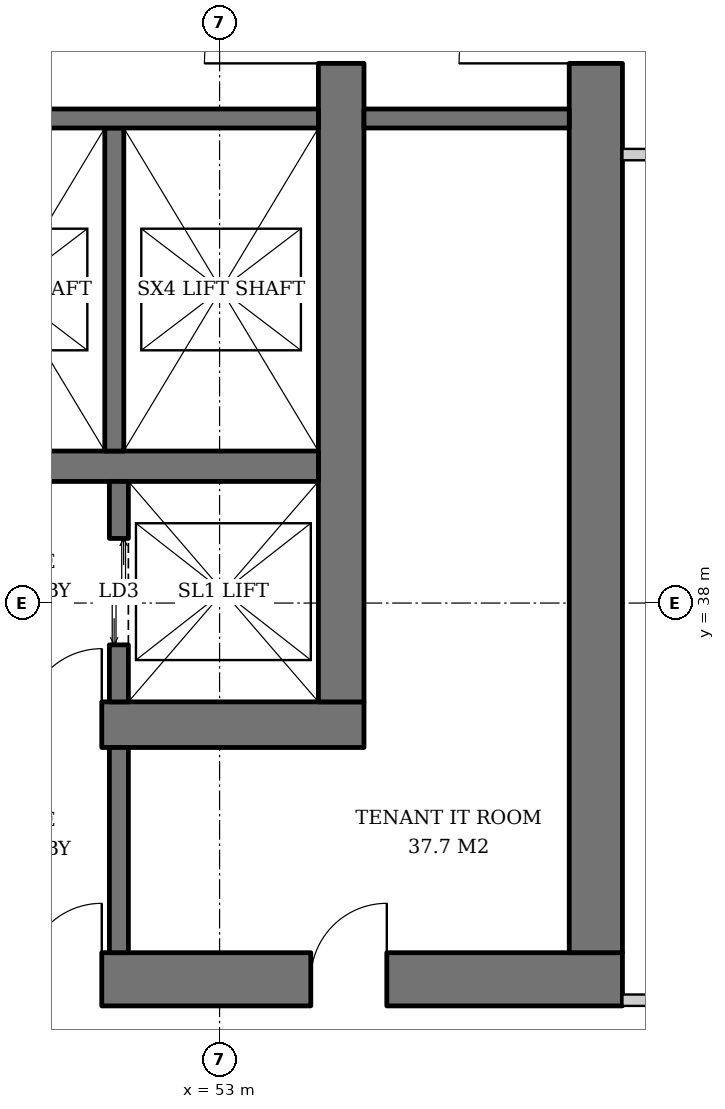
"""IFC4 building model, lengths in metres.
Left out: names, types, materials, properties, quantities, classifications, styles, units other than length and angle.
Written with IfcOpenShell. Run it as: python <this file> out.ifc"""

import sys

from ifc_helpers import new_model, si_unit, direction, frame, frame_2d, origin, place, context, subcontext, project, spatial, rectangle, extrude, element, fill, save


model = new_model("IFC4")
c1 = context("Model", 3, precision=1e-05, world=origin(), true_north=direction((0.0, 1.0)))
c2 = subcontext(c1, "Body", "Model", "MODEL_VIEW")
j1 = project(units=[si_unit("LENGTHUNIT", "METRE"), si_unit("PLANEANGLEUNIT", "RADIAN")], contexts=[c1])
p1 = place(None, origin())
s1 = spatial("IfcSite", under=j1, at=p1, CompositionType="ELEMENT")
p2 = place(p1, origin())
s2 = spatial("IfcBuilding", under=s1, at=p2, CompositionType="ELEMENT")
p3 = place(p2, frame((0.0, 0.0, 100.8)))
s3 = spatial("IfcBuildingStorey", under=s2, at=p3, CompositionType="ELEMENT", Elevation=100.8)
p4 = place(p3, frame((35.1, 36.4, 0.0), z_axis=(0.0, 0.0, 1.0), x_axis=(1.0, 0.0, 0.0)))
e1 = element("IfcWall", 1, at=p4, inside=s3, PredefinedType="SHEAR", context=c2, shape_type="SweptSolid", body=[
    extrude(rectangle(XDim=19.8, YDim=0.6, at=frame_2d((9.9, 0.0))), origin(), (0.0, 0.0, 1.0), 3.8),
])
p5 = place(p4, frame((3.9, 0.0, 0.0)))
e2 = element("IfcOpeningElement", 2, at=p5, cuts=e1, PredefinedType="OPENING", context=c2, shape_type="SweptSolid", body=[
    extrude(rectangle(XDim=1.0, YDim=2.1, at=frame_2d((0.5, 1.05))), frame((0.0, 0.31, 0.0), z_axis=(0.0, -1.0, 0.0), x_axis=(1.0, 0.0, 0.0)), (0.0, 0.0, 1.0), 0.62),
])
p6 = place(p4, frame((15.35, 0.0, 0.0)))
e3 = element("IfcOpeningElement", 3, at=p6, cuts=e1, PredefinedType="OPENING", context=c2, shape_type="SweptSolid", body=[
    extrude(rectangle(XDim=1.0, YDim=2.1, at=frame_2d((0.5, 1.05))), frame((0.0, 0.31, 0.0), z_axis=(0.0, -1.0, 0.0), x_axis=(1.0, 0.0, 0.0)), (0.0, 0.0, 1.0), 0.62),
])
p7 = place(p3, frame((54.6, 36.7, 0.0), z_axis=(0.0, 0.0, 1.0), x_axis=(0.0, 1.0, 0.0)))
e4 = element("IfcWall", 4, at=p7, inside=s3, PredefinedType="SHEAR", context=c2, shape_type="SweptSolid", body=[
    extrude(rectangle(XDim=18.6, YDim=0.6, at=frame_2d((9.3, 0.0))), origin(), (0.0, 0.0, 1.0), 3.8),
])
p8 = place(p7, frame((8.4, 0.0, 0.0)))
e5 = element("IfcOpeningElement", 5, at=p8, cuts=e4, PredefinedType="OPENING", context=c2, shape_type="SweptSolid", body=[
    extrude(rectangle(XDim=1.8, YDim=2.4, at=frame_2d((0.9, 1.2))), frame((0.0, 0.31, 0.0), z_axis=(0.0, -1.0, 0.0), x_axis=(1.0, 0.0, 0.0)), (0.0, 0.0, 1.0), 0.62),
])
p9 = place(p3, frame((31.7, 33.05, 0.0), z_axis=(0.0, 0.0, 1.0), x_axis=(1.0, 0.0, 0.0)))
e6 = element("IfcWall", 6, at=p9, inside=s3, PredefinedType="SHEAR", context=c2, shape_type="SweptSolid", body=[
    extrude(rectangle(XDim=26.6, YDim=0.7, at=frame_2d((13.3, 0.0))), origin(), (0.0, 0.0, 1.0), 3.8),
])
p10 = place(p9, frame((7.3, 0.0, 0.0)))
e7 = element("IfcOpeningElement", 7, at=p10, cuts=e6, PredefinedType="OPENING", context=c2, shape_type="SweptSolid", body=[
    extrude(rectangle(XDim=1.0, YDim=2.1, at=frame_2d((0.5, 1.05))), frame((0.0, 0.36, 0.0), z_axis=(0.0, -1.0, 0.0), x_axis=(1.0, 0.0, 0.0)), (0.0, 0.0, 1.0), 0.72),
])
p11 = place(p9, frame((18.75, 0.0, 0.0)))
e8 = element("IfcOpeningElement", 8, at=p11, cuts=e6, PredefinedType="OPENING", context=c2, shape_type="SweptSolid", body=[
    extrude(rectangle(XDim=1.0, YDim=2.1, at=frame_2d((0.5, 1.05))), frame((0.0, 0.36, 0.0), z_axis=(0.0, -1.0, 0.0), x_axis=(1.0, 0.0, 0.0)), (0.0, 0.0, 1.0), 0.72),
])
p12 = place(p9, frame((3.2, 0.0, 0.0)))
e9 = element("IfcOpeningElement", 9, at=p12, cuts=e6, PredefinedType="OPENING", context=c2, shape_type="SweptSolid", body=[
    extrude(rectangle(XDim=1.0, YDim=2.1, at=frame_2d((0.5, 1.05))), frame((0.0, 0.36, 0.0), z_axis=(0.0, -1.0, 0.0), x_axis=(1.0, 0.0, 0.0)), (0.0, 0.0, 1.0), 0.72),
])
p13 = place(p9, frame((10.42, 0.0, 0.0)))
e10 = element("IfcOpeningElement", 10, at=p13, cuts=e6, PredefinedType="OPENING", context=c2, shape_type="SweptSolid", body=[
    extrude(rectangle(XDim=1.0, YDim=2.1, at=frame_2d((0.5, 1.05))), frame((0.0, 0.36, 0.0), z_axis=(0.0, -1.0, 0.0), x_axis=(1.0, 0.0, 0.0)), (0.0, 0.0, 1.0), 0.72),
])
p14 = place(p9, frame((14.46, 0.0, 0.0)))
e11 = element("IfcOpeningElement", 11, at=p14, cuts=e6, PredefinedType="OPENING", context=c2, shape_type="SweptSolid", body=[
    extrude(rectangle(XDim=1.0, YDim=2.1, at=frame_2d((0.5, 1.05))), frame((0.0, 0.36, 0.0), z_axis=(0.0, -1.0, 0.0), x_axis=(1.0, 0.0, 0.0)), (0.0, 0.0, 1.0), 0.72),
])
p15 = place(p9, frame((22.5, 0.0, 0.0)))
e12 = element("IfcOpeningElement", 12, at=p15, cuts=e6, PredefinedType="OPENING", context=c2, shape_type="SweptSolid", body=[
    extrude(rectangle(XDim=1.0, YDim=2.1, at=frame_2d((0.5, 1.05))), frame((0.0, 0.36, 0.0), z_axis=(0.0, -1.0, 0.0), x_axis=(1.0, 0.0, 0.0)), (0.0, 0.0, 1.0), 0.72),
])
p16 = place(p3, frame((57.95, 33.4, 0.0), z_axis=(0.0, 0.0, 1.0), x_axis=(0.0, 1.0, 0.0)))
e13 = element("IfcWall", 13, at=p16, inside=s3, PredefinedType="SHEAR", context=c2, shape_type="SweptSolid", body=[
    extrude(rectangle(XDim=25.2, YDim=0.7, at=frame_2d((12.6, 0.0))), origin(), (0.0, 0.0, 1.0), 3.8),
])
p17 = place(p16, frame((11.7, 0.0, 0.0)))
e14 = element("IfcOpeningElement", 14, at=p17, cuts=e13, PredefinedType="OPENING", context=c2, shape_type="SweptSolid", body=[
    extrude(rectangle(XDim=1.8, YDim=2.4, at=frame_2d((0.9, 1.2))), frame((0.0, 0.36, 0.0), z_axis=(0.0, -1.0, 0.0), x_axis=(1.0, 0.0, 0.0)), (0.0, 0.0, 1.0), 0.72),
])
p18 = place(p3, frame((35.7, 39.8, 0.0), z_axis=(0.0, 0.0, 1.0), x_axis=(1.0, 0.0, 0.0)))
e15 = element("IfcWall", 15, at=p18, inside=s3, PredefinedType="SHEAR", context=c2, shape_type="SweptSolid", body=[
    extrude(rectangle(XDim=18.6, YDim=0.4, at=frame_2d((9.3, 0.0))), origin(), (0.0, 0.0, 1.0), 3.8),
])
p19 = place(p3, frame((51.675, 36.7, 0.0), z_axis=(0.0, 0.0, 1.0), x_axis=(0.0, 1.0, 0.0)))
e16 = element("IfcWall", 16, at=p19, inside=s3, PredefinedType="SHEAR", context=c2, shape_type="SweptSolid", body=[
    extrude(rectangle(XDim=2.9, YDim=0.25, at=frame_2d((1.45, 0.0))), origin(), (0.0, 0.0, 1.0), 3.8),
])
p20 = place(p19, frame((0.75, 0.0, 0.0)))
e17 = element("IfcOpeningElement", 17, at=p20, cuts=e16, PredefinedType="OPENING", context=c2, shape_type="SweptSolid", body=[
    extrude(rectangle(XDim=1.4, YDim=2.4, at=frame_2d((0.7, 1.2))), frame((0.0, 0.135, 0.0), z_axis=(0.0, -1.0, 0.0), x_axis=(1.0, 0.0, 0.0)), (0.0, 0.0, 1.0), 0.27),
])
p21 = place(p3, frame((51.615, 44.25, 0.0), z_axis=(0.0, 0.0, 1.0), x_axis=(0.0, -1.0, 0.0)))
e18 = element("IfcWall", 18, at=p21, inside=s3, PredefinedType="SHEAR", context=c2, shape_type="SweptSolid", body=[
    extrude(rectangle(XDim=4.25, YDim=0.25, at=frame_2d((2.125, 0.0))), origin(), (0.0, 0.0, 1.0), 3.8),
])
p22 = place(p3, frame((48.93, 44.375, 0.0), z_axis=(0.0, 0.0, 1.0), x_axis=(1.0, 0.0, 0.0)))
e19 = element("IfcWall", 19, at=p22, inside=s3, PredefinedType="SHEAR", context=c2, shape_type="SweptSolid", body=[
    extrude(rectangle(XDim=5.37, YDim=0.25, at=frame_2d((2.685, 0.0))), origin(), (0.0, 0.0, 1.0), 3.8),
])
for number, where, z_axis, x_axis in (
    (20, (54.9, 44.375, 0.0), (0.0, 0.0, 1.0), (1.0, 0.0, 0.0)),
    (21, (51.675, 33.4, 0.0), (0.0, 0.0, 1.0), (0.0, 1.0, 0.0)),
):
    element("IfcWall", number, at=place(p3, frame(where, z_axis=z_axis, x_axis=x_axis)), inside=s3, PredefinedType="SOLIDWALL", context=c2, shape_type="SweptSolid", body=[
        extrude(rectangle(XDim=2.7, YDim=0.25, at=frame_2d((1.35, 0.0))), origin(), (0.0, 0.0, 1.0), 3.62),
    ])
for number, where, z_axis, x_axis in (
    (22, (58.3, 32.775, 0.0), (0.0, 0.0, 1.0), (1.0, 0.0, 0.0)),
    (23, (58.3, 43.9, 0.0), (0.0, 0.0, 1.0), (1.0, 0.0, 0.0)),
):
    element("IfcWall", number, at=place(p3, frame(where, z_axis=z_axis, x_axis=x_axis)), inside=s3, PredefinedType="PARTITIONING", context=c2, shape_type="SweptSolid", body=[
        extrude(rectangle(XDim=2.925, YDim=0.15, at=frame_2d((1.462, 0.0))), origin(), (0.0, 0.0, 1.0), 3.62),
    ])
p23 = place(p20, origin())
e24 = element("IfcDoor", 24, at=p23, inside=s3, OperationType="DOUBLE_DOOR_SLIDING", PredefinedType="DOOR", context=c2, shape_type="SweptSolid", body=[
    extrude(rectangle(XDim=1.4, YDim=2.4, at=frame_2d((0.7, 1.2))), frame((0.0, 0.025, 0.0), z_axis=(0.0, -1.0, 0.0), x_axis=(1.0, 0.0, 0.0)), (0.0, 0.0, 1.0), 0.05),
])
fill(e17, e24)
p24 = place(p8, origin())
e25 = element("IfcDoor", 25, at=p24, inside=s3, OperationType="DOUBLE_DOOR_SINGLE_SWING", PredefinedType="DOOR", context=c2, shape_type="SweptSolid", body=[
    extrude(rectangle(XDim=1.8, YDim=2.4, at=frame_2d((0.9, 1.2))), frame((0.0, 0.025, 0.0), z_axis=(0.0, -1.0, 0.0), x_axis=(1.0, 0.0, 0.0)), (0.0, 0.0, 1.0), 0.05),
])
fill(e5, e25)
p25 = place(p6, origin())
e26 = element("IfcDoor", 26, at=p25, inside=s3, OperationType="SINGLE_SWING_RIGHT", PredefinedType="DOOR", context=c2, shape_type="SweptSolid", body=[
    extrude(rectangle(XDim=1.0, YDim=2.1, at=frame_2d((0.5, 1.05))), frame((0.0, 0.025, 0.0), z_axis=(0.0, -1.0, 0.0), x_axis=(1.0, 0.0, 0.0)), (0.0, 0.0, 1.0), 0.05),
])
fill(e3, e26)
p26 = place(p17, origin())
e27 = element("IfcDoor", 27, at=p26, inside=s3, OperationType="DOUBLE_DOOR_SINGLE_SWING", PredefinedType="DOOR", context=c2, shape_type="SweptSolid", body=[
    extrude(rectangle(XDim=1.8, YDim=2.4, at=frame_2d((0.9, 1.2))), frame((0.0, 0.025, 0.0), z_axis=(0.0, -1.0, 0.0), x_axis=(1.0, 0.0, 0.0)), (0.0, 0.0, 1.0), 0.05),
])
fill(e14, e27)
p27 = place(p11, origin())
e28 = element("IfcDoor", 28, at=p27, inside=s3, OperationType="SINGLE_SWING_RIGHT", PredefinedType="DOOR", context=c2, shape_type="SweptSolid", body=[
    extrude(rectangle(XDim=1.0, YDim=2.1, at=frame_2d((0.5, 1.05))), frame((0.0, 0.025, 0.0), z_axis=(0.0, -1.0, 0.0), x_axis=(1.0, 0.0, 0.0)), (0.0, 0.0, 1.0), 0.05),
])
fill(e8, e28)
p28 = place(p15, origin())
e29 = element("IfcDoor", 29, at=p28, inside=s3, OperationType="SINGLE_SWING_RIGHT", PredefinedType="DOOR", context=c2, shape_type="SweptSolid", body=[
    extrude(rectangle(XDim=1.0, YDim=2.1, at=frame_2d((0.5, 1.05))), frame((0.0, 0.34, 0.0), z_axis=(0.0, -1.0, 0.0), x_axis=(1.0, 0.0, 0.0)), (0.0, 0.0, 1.0), 0.05),
])
fill(e12, e29)
save(model, sys.argv[1])
